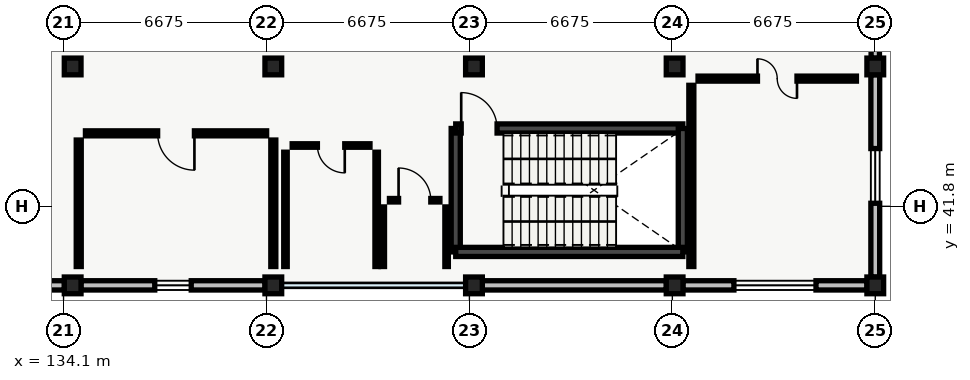
"""IFC4 building model, lengths in metres.
Left out: names, types, materials, properties, quantities, classifications, styles, units other than length and angle.
Written with IfcOpenShell. Run it as: python <this file> out.ifc"""

import sys

from ifc_helpers import new_model, si_unit, direction, frame, frame_2d, origin, origin_2d, place, context, subcontext, project, spatial, rectangle, extrude, element, fill, save


model = new_model("IFC4")
c1 = context("Model", 3, precision=1e-05, world=origin(), true_north=direction((0.0, 1.0)))
c2 = subcontext(c1, "Body", "Model", "MODEL_VIEW")
j1 = project(units=[si_unit("LENGTHUNIT", "METRE"), si_unit("PLANEANGLEUNIT", "RADIAN")], contexts=[c1])
p1 = place(None, origin())
s1 = spatial("IfcSite", under=j1, at=p1, CompositionType="ELEMENT")
p2 = place(p1, origin())
s2 = spatial("IfcBuilding", under=s1, at=p2, CompositionType="ELEMENT")
p3 = place(p2, frame((0.0, 0.0, 27.6)))
s3 = spatial("IfcBuildingStorey", under=s2, at=p3, CompositionType="ELEMENT", Elevation=27.6)
for number, where, z_axis, x_axis in (
    (1, (134.4, 39.2, 0.0), (0.0, 0.0, 1.0), (1.0, 0.0, 0.0)),
    (2, (134.4, 46.4, 0.0), (0.0, 0.0, 1.0), (1.0, 0.0, 0.0)),
    (3, (141.0, 39.2, 0.0), (0.0, 0.0, 1.0), (1.0, 0.0, 0.0)),
    (4, (141.0, 46.4, 0.0), (0.0, 0.0, 1.0), (1.0, 0.0, 0.0)),
    (5, (147.6, 39.2, 0.0), (0.0, 0.0, 1.0), (1.0, 0.0, 0.0)),
    (6, (147.6, 46.4, 0.0), (0.0, 0.0, 1.0), (1.0, 0.0, 0.0)),
    (7, (154.2, 39.2, 0.0), (0.0, 0.0, 1.0), (1.0, 0.0, 0.0)),
    (8, (154.2, 46.4, 0.0), (0.0, 0.0, 1.0), (1.0, 0.0, 0.0)),
    (9, (160.8, 39.2, 0.0), (0.0, 0.0, 1.0), (1.0, 0.0, 0.0)),
    (10, (160.8, 46.4, 0.0), (0.0, 0.0, 1.0), (1.0, 0.0, 0.0)),
):
    element("IfcColumn", number, at=place(p3, frame(where, z_axis=z_axis, x_axis=x_axis)), inside=s3, PredefinedType="COLUMN", context=c2, shape_type="SweptSolid", body=[
        extrude(rectangle(XDim=0.55, YDim=0.55, at=origin_2d()), origin(), (0.0, 0.0, 1.0), 4.3),
    ])
p4 = place(p3, frame((160.8, 53.33, 0.0), z_axis=(0.0, 0.0, 1.0), x_axis=(0.0, -1.0, 0.0)))
e11 = element("IfcWall", 11, at=p4, inside=s3, PredefinedType="STANDARD", context=c2, shape_type="SweptSolid", body=[
    extrude(rectangle(XDim=6.66, YDim=0.275, at=frame_2d((3.33, 0.0))), origin(), (0.0, 0.0, 1.0), 3.835),
])
p5 = place(p4, frame((2.13, 0.0, 0.95)))
e12 = element("IfcOpeningElement", 12, at=p5, cuts=e11, PredefinedType="OPENING", context=c2, shape_type="SweptSolid", body=[
    extrude(rectangle(XDim=2.4, YDim=1.65, at=frame_2d((1.2, 0.825))), frame((0.0, 0.137, 0.0), z_axis=(0.0, -1.0, 0.0), x_axis=(1.0, 0.0, 0.0)), (0.0, 0.0, 1.0), 0.275),
])
p6 = place(p3, frame((160.8, 46.13, 0.0), z_axis=(0.0, 0.0, 1.0), x_axis=(0.0, -1.0, 0.0)))
e13 = element("IfcWall", 13, at=p6, inside=s3, PredefinedType="STANDARD", context=c2, shape_type="SweptSolid", body=[
    extrude(rectangle(XDim=6.66, YDim=0.29, at=frame_2d((3.33, 0.0))), origin(), (0.0, 0.0, 1.0), 3.835),
])
p7 = place(p6, frame((2.43, 0.0, 0.95)))
e14 = element("IfcOpeningElement", 14, at=p7, cuts=e13, PredefinedType="OPENING", context=c2, shape_type="SweptSolid", body=[
    extrude(rectangle(XDim=1.8, YDim=1.65, at=frame_2d((0.9, 0.825))), frame((0.0, 0.145, 0.0), z_axis=(0.0, -1.0, 0.0), x_axis=(1.0, 0.0, 0.0)), (0.0, 0.0, 1.0), 0.29),
])
p8 = place(p3, frame((160.53, 39.2, 0.0), z_axis=(0.0, 0.0, 1.0), x_axis=(-1.0, 0.0, 0.0)))
e15 = element("IfcWall", 15, at=p8, inside=s3, PredefinedType="STANDARD", context=c2, shape_type="SweptSolid", body=[
    extrude(rectangle(XDim=6.06, YDim=0.305, at=frame_2d((3.03, 0.0))), origin(), (0.0, 0.0, 1.0), 3.835),
])
p9 = place(p8, frame((1.68, 0.0, 0.95)))
e16 = element("IfcOpeningElement", 16, at=p9, cuts=e15, PredefinedType="OPENING", context=c2, shape_type="SweptSolid", body=[
    extrude(rectangle(XDim=2.7, YDim=1.8, at=frame_2d((1.35, 0.9))), frame((0.0, 0.152, 0.0), z_axis=(0.0, -1.0, 0.0), x_axis=(1.0, 0.0, 0.0)), (0.0, 0.0, 1.0), 0.305),
])
p10 = place(p3, frame((153.93, 39.2, 0.0), z_axis=(0.0, 0.0, 1.0), x_axis=(-1.0, 0.0, 0.0)))
e17 = element("IfcWall", 17, at=p10, inside=s3, PredefinedType="STANDARD", context=c2, shape_type="SweptSolid", body=[
    extrude(rectangle(XDim=6.06, YDim=0.305, at=frame_2d((3.03, 0.0))), origin(), (0.0, 0.0, 1.0), 3.835),
])
p11 = place(p3, frame((140.73, 39.2, 0.0), z_axis=(0.0, 0.0, 1.0), x_axis=(-1.0, 0.0, 0.0)))
e18 = element("IfcWall", 18, at=p11, inside=s3, PredefinedType="STANDARD", context=c2, shape_type="SweptSolid", body=[
    extrude(rectangle(XDim=6.06, YDim=0.305, at=frame_2d((3.03, 0.0))), origin(), (0.0, 0.0, 1.0), 3.835),
])
p12 = place(p11, frame((2.43, 0.0, 0.95)))
e19 = element("IfcOpeningElement", 19, at=p12, cuts=e18, PredefinedType="OPENING", context=c2, shape_type="SweptSolid", body=[
    extrude(rectangle(XDim=1.2, YDim=1.5, at=frame_2d((0.6, 0.75))), frame((0.0, 0.152, 0.0), z_axis=(0.0, -1.0, 0.0), x_axis=(1.0, 0.0, 0.0)), (0.0, 0.0, 1.0), 0.305),
])
p13 = place(p3, frame((134.13, 39.2, 0.0), z_axis=(0.0, 0.0, 1.0), x_axis=(-1.0, 0.0, 0.0)))
e20 = element("IfcWall", 20, at=p13, inside=s3, PredefinedType="STANDARD", context=c2, shape_type="SweptSolid", body=[
    extrude(rectangle(XDim=6.06, YDim=0.305, at=frame_2d((3.03, 0.0))), origin(), (0.0, 0.0, 1.0), 3.835),
])
p14 = place(p13, frame((2.28, 0.0, 0.95)))
e21 = element("IfcOpeningElement", 21, at=p14, cuts=e20, PredefinedType="OPENING", context=c2, shape_type="SweptSolid", body=[
    extrude(rectangle(XDim=1.5, YDim=1.65, at=frame_2d((0.75, 0.825))), frame((0.0, 0.152, 0.0), z_axis=(0.0, -1.0, 0.0), x_axis=(1.0, 0.0, 0.0)), (0.0, 0.0, 1.0), 0.305),
])
p15 = place(p3, frame((147.0, 40.3, 0.0), z_axis=(0.0, 0.0, 1.0), x_axis=(0.0, 1.0, 0.0)))
e22 = element("IfcWall", 22, at=p15, inside=s3, PredefinedType="SHEAR", context=c2, shape_type="SweptSolid", body=[
    extrude(rectangle(XDim=4.06, YDim=0.3, at=frame_2d((2.03, 0.0))), origin(), (0.0, 0.0, 1.0), 4.28),
])
p16 = place(p3, frame((147.0, 44.36, 0.0), z_axis=(0.0, 0.0, 1.0), x_axis=(1.0, 0.0, 0.0)))
e23 = element("IfcWall", 23, at=p16, inside=s3, PredefinedType="SHEAR", context=c2, shape_type="SweptSolid", body=[
    extrude(rectangle(XDim=7.47, YDim=0.3, at=frame_2d((3.735, 0.0))), origin(), (0.0, 0.0, 1.0), 4.28),
])
p17 = place(p16, frame((0.18, 0.0, 0.0)))
e24 = element("IfcOpeningElement", 24, at=p17, cuts=e23, PredefinedType="OPENING", context=c2, shape_type="SweptSolid", body=[
    extrude(rectangle(XDim=1.18, YDim=2.15, at=frame_2d((0.59, 1.075))), frame((0.0, 0.15, 0.0), z_axis=(0.0, -1.0, 0.0), x_axis=(1.0, 0.0, 0.0)), (0.0, 0.0, 1.0), 0.3),
])
p18 = place(p3, frame((154.47, 44.36, 0.0), z_axis=(0.0, 0.0, 1.0), x_axis=(0.0, -1.0, 0.0)))
e25 = element("IfcWall", 25, at=p18, inside=s3, PredefinedType="SHEAR", context=c2, shape_type="SweptSolid", body=[
    extrude(rectangle(XDim=4.06, YDim=0.3, at=frame_2d((2.03, 0.0))), origin(), (0.0, 0.0, 1.0), 4.28),
])
p19 = place(p3, frame((154.47, 40.3, 0.0), z_axis=(0.0, 0.0, 1.0), x_axis=(-1.0, 0.0, 0.0)))
e26 = element("IfcWall", 26, at=p19, inside=s3, PredefinedType="SHEAR", context=c2, shape_type="SweptSolid", body=[
    extrude(rectangle(XDim=7.47, YDim=0.3, at=frame_2d((3.735, 0.0))), origin(), (0.0, 0.0, 1.0), 4.28),
])
p20 = place(p3, frame((144.4, 39.82, 0.0), z_axis=(0.0, 0.0, 1.0), x_axis=(0.0, 1.0, 0.0)))
e27 = element("IfcWall", 27, at=p20, inside=s3, PredefinedType="PARTITIONING", context=c2, shape_type="SweptSolid", body=[
    extrude(rectangle(XDim=3.76, YDim=0.115, at=frame_2d((1.88, 0.0))), origin(), (0.0, 0.0, 1.0), 3.95),
])
p21 = place(p3, frame((144.18, 43.8, 0.0), z_axis=(0.0, 0.0, 1.0), x_axis=(-1.0, 0.0, 0.0)))
e28 = element("IfcWall", 28, at=p21, inside=s3, PredefinedType="PARTITIONING", context=c2, shape_type="SweptSolid", body=[
    extrude(rectangle(XDim=2.56, YDim=0.115, at=frame_2d((1.28, 0.0))), origin(), (0.0, 0.0, 1.0), 3.95),
])
p22 = place(p21, frame((0.83, 0.0, 0.0)))
e29 = element("IfcOpeningElement", 29, at=p22, cuts=e28, PredefinedType="OPENING", context=c2, shape_type="SweptSolid", body=[
    extrude(rectangle(XDim=0.9, YDim=2.1, at=frame_2d((0.45, 1.05))), frame((0.0, 0.058, 0.0), z_axis=(0.0, -1.0, 0.0), x_axis=(1.0, 0.0, 0.0)), (0.0, 0.0, 1.0), 0.115),
])
p23 = place(p3, frame((141.4, 43.58, 0.0), z_axis=(0.0, 0.0, 1.0), x_axis=(0.0, -1.0, 0.0)))
e30 = element("IfcWall", 30, at=p23, inside=s3, PredefinedType="PARTITIONING", context=c2, shape_type="SweptSolid", body=[
    extrude(rectangle(XDim=3.76, YDim=0.115, at=frame_2d((1.88, 0.0))), origin(), (0.0, 0.0, 1.0), 3.95),
])
p24 = place(p3, frame((146.7, 39.82, 0.0), z_axis=(0.0, 0.0, 1.0), x_axis=(0.0, 1.0, 0.0)))
e31 = element("IfcWall", 31, at=p24, inside=s3, PredefinedType="PARTITIONING", context=c2, shape_type="SweptSolid", body=[
    extrude(rectangle(XDim=1.96, YDim=0.115, at=frame_2d((0.98, 0.0))), origin(), (0.0, 0.0, 1.0), 3.95),
])
p25 = place(p3, frame((146.48, 42.0, 0.0), z_axis=(0.0, 0.0, 1.0), x_axis=(-1.0, 0.0, 0.0)))
e32 = element("IfcWall", 32, at=p25, inside=s3, PredefinedType="PARTITIONING", context=c2, shape_type="SweptSolid", body=[
    extrude(rectangle(XDim=1.66, YDim=0.115, at=frame_2d((0.83, 0.0))), origin(), (0.0, 0.0, 1.0), 3.95),
])
p26 = place(p25, frame((0.3, 0.0, 0.0)))
e33 = element("IfcOpeningElement", 33, at=p26, cuts=e32, PredefinedType="OPENING", context=c2, shape_type="SweptSolid", body=[
    extrude(rectangle(XDim=1.06, YDim=2.12, at=frame_2d((0.53, 1.06))), frame((0.0, 0.058, 0.0), z_axis=(0.0, -1.0, 0.0), x_axis=(1.0, 0.0, 0.0)), (0.0, 0.0, 1.0), 0.115),
])
p27 = place(p3, frame((144.6, 41.78, 0.0), z_axis=(0.0, 0.0, 1.0), x_axis=(0.0, -1.0, 0.0)))
e34 = element("IfcWall", 34, at=p27, inside=s3, PredefinedType="PARTITIONING", context=c2, shape_type="SweptSolid", body=[
    extrude(rectangle(XDim=1.96, YDim=0.115, at=frame_2d((0.98, 0.0))), origin(), (0.0, 0.0, 1.0), 3.95),
])
p28 = place(p3, frame((141.0, 39.82, 0.0), z_axis=(0.0, 0.0, 1.0), x_axis=(0.0, 1.0, 0.0)))
e35 = element("IfcWall", 35, at=p28, inside=s3, PredefinedType="PARTITIONING", context=c2, shape_type="SweptSolid", body=[
    extrude(rectangle(XDim=4.16, YDim=0.165, at=frame_2d((2.08, 0.0))), origin(), (0.0, 0.0, 1.0), 3.685),
])
p29 = place(p3, frame((140.78, 44.2, 0.0), z_axis=(0.0, 0.0, 1.0), x_axis=(-1.0, 0.0, 0.0)))
e36 = element("IfcWall", 36, at=p29, inside=s3, PredefinedType="PARTITIONING", context=c2, shape_type="SweptSolid", body=[
    extrude(rectangle(XDim=5.96, YDim=0.165, at=frame_2d((2.98, 0.0))), origin(), (0.0, 0.0, 1.0), 3.885),
])
p30 = place(p29, frame((2.375, 0.0, 0.0)))
e37 = element("IfcOpeningElement", 37, at=p30, cuts=e36, PredefinedType="OPENING", context=c2, shape_type="SweptSolid", body=[
    extrude(rectangle(XDim=1.21, YDim=2.16, at=frame_2d((0.605, 1.08))), frame((0.0, 0.083, 0.0), z_axis=(0.0, -1.0, 0.0), x_axis=(1.0, 0.0, 0.0)), (0.0, 0.0, 1.0), 0.165),
])
p31 = place(p3, frame((134.6, 43.98, 0.0), z_axis=(0.0, 0.0, 1.0), x_axis=(0.0, -1.0, 0.0)))
e38 = element("IfcWall", 38, at=p31, inside=s3, PredefinedType="PARTITIONING", context=c2, shape_type="SweptSolid", body=[
    extrude(rectangle(XDim=4.16, YDim=0.165, at=frame_2d((2.08, 0.0))), origin(), (0.0, 0.0, 1.0), 3.685),
])
p32 = place(p3, frame((160.18, 46.0, 0.0), z_axis=(0.0, 0.0, 1.0), x_axis=(-1.0, 0.0, 0.0)))
e39 = element("IfcWall", 39, at=p32, inside=s3, PredefinedType="PARTITIONING", context=c2, shape_type="SweptSolid", body=[
    extrude(rectangle(XDim=5.21, YDim=0.165, at=frame_2d((2.605, 0.0))), origin(), (0.0, 0.0, 1.0), 3.95),
])
p33 = place(p32, frame((1.955, 0.0, 0.0)))
e40 = element("IfcOpeningElement", 40, at=p33, cuts=e39, PredefinedType="OPENING", context=c2, shape_type="SweptSolid", body=[
    extrude(rectangle(XDim=1.3, YDim=2.18, at=frame_2d((0.65, 1.09))), frame((0.0, 0.083, 0.0), z_axis=(0.0, -1.0, 0.0), x_axis=(1.0, 0.0, 0.0)), (0.0, 0.0, 1.0), 0.165),
])
p34 = place(p3, frame((154.75, 45.78, 0.0), z_axis=(0.0, 0.0, 1.0), x_axis=(0.0, -1.0, 0.0)))
e41 = element("IfcWall", 41, at=p34, inside=s3, PredefinedType="PARTITIONING", context=c2, shape_type="SweptSolid", body=[
    extrude(rectangle(XDim=5.96, YDim=0.165, at=frame_2d((2.98, 0.0))), origin(), (0.0, 0.0, 1.0), 3.95),
])
p35 = place(p7, origin())
e42 = element("IfcWindow", 42, at=p35, inside=s3, PartitioningType="SINGLE_PANEL", PredefinedType="WINDOW", context=c2, shape_type="SweptSolid", body=[
    extrude(rectangle(XDim=1.8, YDim=1.65, at=frame_2d((0.9, 0.825))), frame((0.0, 0.03, 0.0), z_axis=(0.0, -1.0, 0.0), x_axis=(1.0, 0.0, 0.0)), (0.0, 0.0, 1.0), 0.06),
])
fill(e14, e42)
p36 = place(p9, origin())
e43 = element("IfcWindow", 43, at=p36, inside=s3, PartitioningType="SINGLE_PANEL", PredefinedType="WINDOW", context=c2, shape_type="SweptSolid", body=[
    extrude(rectangle(XDim=2.7, YDim=1.8, at=frame_2d((1.35, 0.9))), frame((0.0, 0.03, 0.0), z_axis=(0.0, -1.0, 0.0), x_axis=(1.0, 0.0, 0.0)), (0.0, 0.0, 1.0), 0.06),
])
fill(e16, e43)
p37 = place(p12, origin())
e44 = element("IfcWindow", 44, at=p37, inside=s3, PartitioningType="SINGLE_PANEL", PredefinedType="WINDOW", context=c2, shape_type="SweptSolid", body=[
    extrude(rectangle(XDim=1.2, YDim=1.5, at=frame_2d((0.6, 0.75))), frame((0.0, 0.03, 0.0), z_axis=(0.0, -1.0, 0.0), x_axis=(1.0, 0.0, 0.0)), (0.0, 0.0, 1.0), 0.06),
])
fill(e19, e44)
p38 = place(p17, origin())
e45 = element("IfcDoor", 45, at=p38, inside=s3, OperationType="SINGLE_SWING_LEFT", PredefinedType="DOOR", context=c2, shape_type="SweptSolid", body=[
    extrude(rectangle(XDim=1.18, YDim=2.15, at=frame_2d((0.59, 1.075))), frame((0.0, 0.025, 0.0), z_axis=(0.0, -1.0, 0.0), x_axis=(1.0, 0.0, 0.0)), (0.0, 0.0, 1.0), 0.05),
])
fill(e24, e45)
p39 = place(p22, origin())
e46 = element("IfcDoor", 46, at=p39, inside=s3, OperationType="SINGLE_SWING_LEFT", PredefinedType="DOOR", context=c2, shape_type="SweptSolid", body=[
    extrude(rectangle(XDim=0.9, YDim=2.1, at=frame_2d((0.45, 1.05))), frame((0.0, 0.025, 0.0), z_axis=(0.0, -1.0, 0.0), x_axis=(1.0, 0.0, 0.0)), (0.0, 0.0, 1.0), 0.05),
])
fill(e29, e46)
p40 = place(p26, origin())
e47 = element("IfcDoor", 47, at=p40, inside=s3, OperationType="SINGLE_SWING_RIGHT", PredefinedType="DOOR", context=c2, shape_type="SweptSolid", body=[
    extrude(rectangle(XDim=1.06, YDim=2.12, at=frame_2d((0.53, 1.06))), frame((0.0, 0.025, 0.0), z_axis=(0.0, -1.0, 0.0), x_axis=(1.0, 0.0, 0.0)), (0.0, 0.0, 1.0), 0.05),
])
fill(e33, e47)
p41 = place(p30, origin())
e48 = element("IfcDoor", 48, at=p41, inside=s3, OperationType="SINGLE_SWING_LEFT", PredefinedType="DOOR", context=c2, shape_type="SweptSolid", body=[
    extrude(rectangle(XDim=1.21, YDim=2.16, at=frame_2d((0.605, 1.08))), frame((0.0, 0.025, 0.0), z_axis=(0.0, -1.0, 0.0), x_axis=(1.0, 0.0, 0.0)), (0.0, 0.0, 1.0), 0.05),
])
fill(e37, e48)
p42 = place(p33, origin())
e49 = element("IfcDoor", 49, at=p42, inside=s3, OperationType="DOUBLE_DOOR_SINGLE_SWING", PredefinedType="DOOR", context=c2, shape_type="SweptSolid", body=[
    extrude(rectangle(XDim=1.3, YDim=2.18, at=frame_2d((0.65, 1.09))), frame((0.0, 0.025, 0.0), z_axis=(0.0, -1.0, 0.0), x_axis=(1.0, 0.0, 0.0)), (0.0, 0.0, 1.0), 0.05),
])
fill(e40, e49)
save(model, sys.argv[1])
